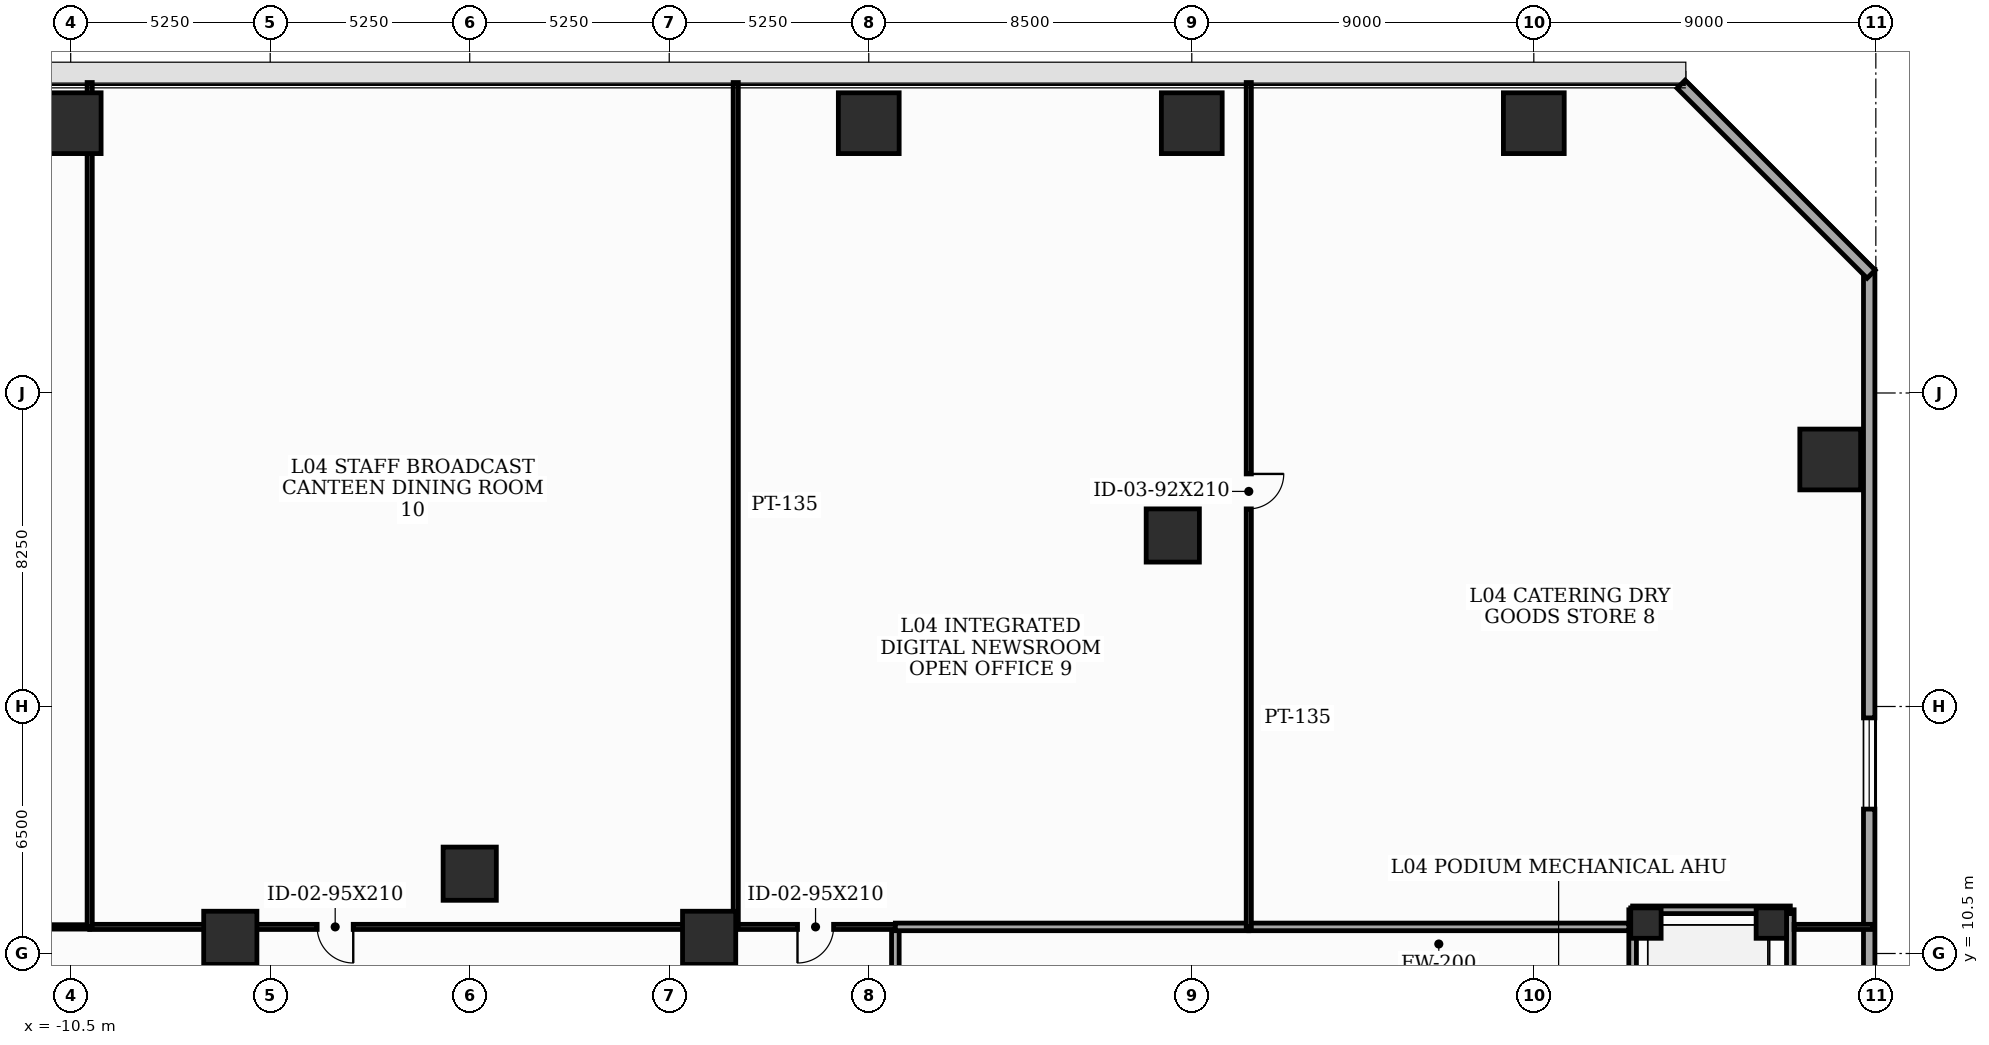
"""IFC4 building model, lengths in metres.
Left out: names, types, materials, properties, quantities, classifications, styles, units other than length and angle.
Written with IfcOpenShell. Run it as: python <this file> out.ifc"""

import sys

from ifc_helpers import new_model, si_unit, direction, frame, frame_2d, origin, origin_2d, place, context, subcontext, project, spatial, rectangle, extrude, element, fill, save


model = new_model("IFC4")
c1 = context("Model", 3, precision=1e-05, world=origin(), true_north=direction((0.0, 1.0)))
c2 = subcontext(c1, "Body", "Model", "MODEL_VIEW")
j1 = project(units=[si_unit("LENGTHUNIT", "METRE"), si_unit("PLANEANGLEUNIT", "RADIAN")], contexts=[c1])
p1 = place(None, origin())
s1 = spatial("IfcSite", under=j1, at=p1, CompositionType="ELEMENT")
p2 = place(p1, origin())
s2 = spatial("IfcBuilding", under=s1, at=p2, CompositionType="ELEMENT")
p3 = place(p2, frame((0.0, 0.0, 20.8)))
s3 = spatial("IfcBuildingStorey", under=s2, at=p3, CompositionType="ELEMENT", Elevation=20.8)
for number, where, z_axis, x_axis in (
    (1, (6.3, 10.912, 0.0), (0.0, 0.0, 1.0), (1.0, 0.0, 0.0)),
    (2, (0.0, 12.6, 0.0), (0.0, 0.0, 1.0), (1.0, 0.0, 0.0)),
    (3, (-6.3, 10.912, 0.0), (0.0, 0.0, 1.0), (1.0, 0.0, 0.0)),
):
    element("IfcColumn", number, at=place(p3, frame(where, z_axis=z_axis, x_axis=x_axis)), inside=s3, PredefinedType="COLUMN", context=c2, shape_type="SweptSolid", body=[
        extrude(rectangle(XDim=1.4, YDim=1.4, at=origin_2d()), origin(), (0.0, 0.0, 1.0), 5.2),
    ])
for number, where, z_axis, x_axis in (
    (4, (35.8, 23.5, 0.0), (0.0, 0.0, 1.0), (1.0, 0.0, 0.0)),
    (5, (28.0, 32.35, 0.0), (0.0, 0.0, 1.0), (1.0, 0.0, 0.0)),
    (6, (19.0, 32.35, 0.0), (0.0, 0.0, 1.0), (1.0, 0.0, 0.0)),
    (7, (10.5, 32.35, 0.0), (0.0, 0.0, 1.0), (1.0, 0.0, 0.0)),
    (8, (-10.5, 32.35, 0.0), (0.0, 0.0, 1.0), (1.0, 0.0, 0.0)),
):
    element("IfcColumn", number, at=place(p3, frame(where, z_axis=z_axis, x_axis=x_axis)), inside=s3, PredefinedType="COLUMN", context=c2, shape_type="SweptSolid", body=[
        extrude(rectangle(XDim=1.6, YDim=1.6, at=origin_2d()), origin(), (0.0, 0.0, 1.0), 5.2),
    ])
p4 = place(p3, frame((18.5, 21.5, 0.0), z_axis=(0.0, 0.0, 1.0), x_axis=(1.0, 0.0, 0.0)))
e9 = element("IfcColumn", 9, at=p4, inside=s3, PredefinedType="COLUMN", context=c2, shape_type="SweptSolid", body=[
    extrude(rectangle(XDim=1.4, YDim=1.4, at=origin_2d()), origin(), (0.0, 0.0, 1.0), 5.2),
])
for number, where, z_axis, x_axis in (
    (10, (34.25, 11.3, 0.0), (0.0, 0.0, 1.0), (1.0, 0.0, 0.0)),
    (11, (30.95, 11.3, 0.0), (0.0, 0.0, 1.0), (1.0, 0.0, 0.0)),
):
    element("IfcColumn", number, at=place(p3, frame(where, z_axis=z_axis, x_axis=x_axis)), inside=s3, PredefinedType="COLUMN", context=c2, shape_type="SweptSolid", body=[
        extrude(rectangle(XDim=0.8, YDim=0.8, at=origin_2d()), origin(), (0.0, 0.0, 1.0), 5.2),
    ])
p5 = place(p3, frame((36.825, -19.5, 0.0), z_axis=(0.0, 0.0, 1.0), x_axis=(0.0, 1.0, 0.0)))
e12 = element("IfcWall", 12, at=p5, inside=s3, PredefinedType="SOLIDWALL", context=c2, shape_type="SweptSolid", body=[
    extrude(rectangle(XDim=48.0, YDim=0.3, at=frame_2d((24.0, 0.0))), origin(), (0.0, 0.0, 1.0), 4.94),
])
p6 = place(p5, frame((3.6, 0.0, 0.9)))
e13 = element("IfcOpeningElement", 13, at=p6, cuts=e12, PredefinedType="OPENING", context=c2, shape_type="SweptSolid", body=[
    extrude(rectangle(XDim=2.4, YDim=1.35, at=frame_2d((1.2, 0.675))), frame((0.0, 0.16, 0.0), z_axis=(0.0, -1.0, 0.0), x_axis=(1.0, 0.0, 0.0)), (0.0, 0.0, 1.0), 0.32),
])
p7 = place(p5, frame((22.8, 0.0, 0.9)))
e14 = element("IfcOpeningElement", 14, at=p7, cuts=e12, PredefinedType="OPENING", context=c2, shape_type="SweptSolid", body=[
    extrude(rectangle(XDim=1.8, YDim=1.35, at=frame_2d((0.9, 0.675))), frame((0.0, 0.16, 0.0), z_axis=(0.0, -1.0, 0.0), x_axis=(1.0, 0.0, 0.0)), (0.0, 0.0, 1.0), 0.32),
])
p8 = place(p5, frame((33.8, 0.0, 0.9)))
e15 = element("IfcOpeningElement", 15, at=p8, cuts=e12, PredefinedType="OPENING", context=c2, shape_type="SweptSolid", body=[
    extrude(rectangle(XDim=2.4, YDim=1.35, at=frame_2d((1.2, 0.675))), frame((0.0, 0.16, 0.0), z_axis=(0.0, -1.0, 0.0), x_axis=(1.0, 0.0, 0.0)), (0.0, 0.0, 1.0), 0.32),
])
p9 = place(p3, frame((36.876, 28.376, 0.0), z_axis=(0.0, 0.0, 1.0), x_axis=(-0.707106781187, 0.707106781187, 0.0)))
e16 = element("IfcWall", 16, at=p9, inside=s3, PredefinedType="SOLIDWALL", context=c2, shape_type="SweptSolid", body=[
    extrude(rectangle(XDim=7.071, YDim=0.3, at=frame_2d((3.536, 0.0))), origin(), (0.0, 0.0, 1.0), 4.94),
])
p10 = place(p3, frame((34.75, 4.2, 0.0), z_axis=(0.0, 0.0, 1.0), x_axis=(0.0, 1.0, 0.0)))
e17 = element("IfcWall", 17, at=p10, inside=s3, PredefinedType="SOLIDWALL", context=c2, shape_type="SweptSolid", body=[
    extrude(rectangle(XDim=7.45, YDim=0.2, at=frame_2d((3.725, 0.0))), origin(), (0.0, 0.0, 1.0), 4.94),
])
p11 = place(p3, frame((34.75, 11.65, 0.0), z_axis=(0.0, 0.0, 1.0), x_axis=(-1.0, 0.0, 0.0)))
e18 = element("IfcWall", 18, at=p11, inside=s3, PredefinedType="SOLIDWALL", context=c2, shape_type="SweptSolid", body=[
    extrude(rectangle(XDim=4.15, YDim=0.2, at=frame_2d((2.075, 0.0))), origin(), (0.0, 0.0, 1.0), 4.94),
])
p12 = place(p3, frame((30.6, 11.65, 0.0), z_axis=(0.0, 0.0, 1.0), x_axis=(0.0, -1.0, 0.0)))
e19 = element("IfcWall", 19, at=p12, inside=s3, PredefinedType="SOLIDWALL", context=c2, shape_type="SweptSolid", body=[
    extrude(rectangle(XDim=7.45, YDim=0.2, at=frame_2d((3.725, 0.0))), origin(), (0.0, 0.0, 1.0), 4.94),
])
p13 = place(p12, frame((6.04, 0.0, 0.0)))
e20 = element("IfcOpeningElement", 20, at=p13, cuts=e19, PredefinedType="OPENING", context=c2, shape_type="SweptSolid", body=[
    extrude(rectangle(XDim=1.05, YDim=2.15, at=frame_2d((0.525, 1.075))), frame((0.0, 0.11, 0.0), z_axis=(0.0, -1.0, 0.0), x_axis=(1.0, 0.0, 0.0)), (0.0, 0.0, 1.0), 0.22),
])
p14 = place(p3, frame((11.2, 8.4, 0.0), z_axis=(0.0, 0.0, 1.0), x_axis=(0.0, 1.0, 0.0)))
e21 = element("IfcWall", 21, at=p14, inside=s3, PredefinedType="SOLIDWALL", context=c2, shape_type="SweptSolid", body=[
    extrude(rectangle(XDim=2.8, YDim=0.2, at=frame_2d((1.4, 0.0))), origin(), (0.0, 0.0, 1.0), 3.525),
])
p15 = place(p3, frame((11.2, 11.2, 0.0), z_axis=(0.0, 0.0, 1.0), x_axis=(-1.0, 0.0, 0.0)))
e22 = element("IfcWall", 22, at=p15, inside=s3, PredefinedType="PARTITIONING", context=c2, shape_type="SweptSolid", body=[
    extrude(rectangle(XDim=4.2, YDim=0.135, at=frame_2d((2.1, 0.0))), origin(), (0.0, 0.0, 1.0), 3.525),
])
p16 = place(p15, frame((1.625, 0.0, 0.0)))
e23 = element("IfcOpeningElement", 23, at=p16, cuts=e22, PredefinedType="OPENING", context=c2, shape_type="SweptSolid", body=[
    extrude(rectangle(XDim=0.95, YDim=2.1, at=frame_2d((0.475, 1.05))), frame((0.0, 0.077, 0.0), z_axis=(0.0, -1.0, 0.0), x_axis=(1.0, 0.0, 0.0)), (0.0, 0.0, 1.0), 0.155),
])
p17 = place(p3, frame((7.0, 11.2, 0.0), z_axis=(0.0, 0.0, 1.0), x_axis=(-1.0, 0.0, 0.0)))
e24 = element("IfcWall", 24, at=p17, inside=s3, PredefinedType="PARTITIONING", context=c2, shape_type="SweptSolid", body=[
    extrude(rectangle(XDim=17.0, YDim=0.135, at=frame_2d((8.5, 0.0))), origin(), (0.0, 0.0, 1.0), 3.525),
])
p18 = place(p17, frame((10.065, 0.0, 0.0)))
e25 = element("IfcOpeningElement", 25, at=p18, cuts=e24, PredefinedType="OPENING", context=c2, shape_type="SweptSolid", body=[
    extrude(rectangle(XDim=0.95, YDim=2.1, at=frame_2d((0.475, 1.05))), frame((0.0, 0.077, 0.0), z_axis=(0.0, -1.0, 0.0), x_axis=(1.0, 0.0, 0.0)), (0.0, 0.0, 1.0), 0.155),
])
p19 = place(p3, frame((-10.0, 11.2, 0.0), z_axis=(0.0, 0.0, 1.0), x_axis=(-1.0, 0.0, 0.0)))
e26 = element("IfcWall", 26, at=p19, inside=s3, PredefinedType="PARTITIONING", context=c2, shape_type="SweptSolid", body=[
    extrude(rectangle(XDim=1.2, YDim=0.115, at=frame_2d((0.6, 0.0))), origin(), (0.0, 0.0, 1.0), 3.525),
])
p20 = place(p3, frame((36.92, 11.2, 0.0), z_axis=(0.0, 0.0, 1.0), x_axis=(-1.0, 0.0, 0.0)))
e27 = element("IfcWall", 27, at=p20, inside=s3, PredefinedType="PARTITIONING", context=c2, shape_type="SweptSolid", body=[
    extrude(rectangle(XDim=2.07, YDim=0.135, at=frame_2d((1.035, 0.0))), origin(), (0.0, 0.0, 1.0), 3.425),
])
p21 = place(p3, frame((30.5, 11.2, 0.0), z_axis=(0.0, 0.0, 1.0), x_axis=(-1.0, 0.0, 0.0)))
e28 = element("IfcWall", 28, at=p21, inside=s3, PredefinedType="SOLIDWALL", context=c2, shape_type="SweptSolid", body=[
    extrude(rectangle(XDim=10.0, YDim=0.2, at=frame_2d((5.0, 0.0))), origin(), (0.0, 0.0, 1.0), 4.94),
])
p22 = place(p3, frame((20.5, 11.2, 0.0), z_axis=(0.0, 0.0, 1.0), x_axis=(-1.0, 0.0, 0.0)))
e29 = element("IfcWall", 29, at=p22, inside=s3, PredefinedType="SOLIDWALL", context=c2, shape_type="SweptSolid", body=[
    extrude(rectangle(XDim=9.3, YDim=0.2, at=frame_2d((4.65, 0.0))), origin(), (0.0, 0.0, 1.0), 3.525),
])
p23 = place(p3, frame((20.5, 33.42, 0.0), z_axis=(0.0, 0.0, 1.0), x_axis=(0.0, -1.0, 0.0)))
e30 = element("IfcWall", 30, at=p23, inside=s3, PredefinedType="PARTITIONING", context=c2, shape_type="SweptSolid", body=[
    extrude(rectangle(XDim=22.22, YDim=0.135, at=frame_2d((11.11, 0.0))), origin(), (0.0, 0.0, 1.0), 3.425),
])
p24 = place(p23, frame((10.3, 0.0, 0.0)))
e31 = element("IfcOpeningElement", 31, at=p24, cuts=e30, PredefinedType="OPENING", context=c2, shape_type="SweptSolid", body=[
    extrude(rectangle(XDim=0.92, YDim=2.1, at=frame_2d((0.46, 1.05))), frame((0.0, 0.077, 0.0), z_axis=(0.0, -1.0, 0.0), x_axis=(1.0, 0.0, 0.0)), (0.0, 0.0, 1.0), 0.155),
])
for number, where, z_axis, x_axis in (
    (32, (7.0, 33.42, 0.0), (0.0, 0.0, 1.0), (0.0, -1.0, 0.0)),
    (33, (-10.0, 33.42, 0.0), (0.0, 0.0, 1.0), (0.0, -1.0, 0.0)),
):
    element("IfcWall", number, at=place(p3, frame(where, z_axis=z_axis, x_axis=x_axis)), inside=s3, PredefinedType="PARTITIONING", context=c2, shape_type="SweptSolid", body=[
        extrude(rectangle(XDim=22.22, YDim=0.135, at=frame_2d((11.11, 0.0))), origin(), (0.0, 0.0, 1.0), 3.425),
    ])
p25 = place(p8, origin())
e34 = element("IfcWindow", 34, at=p25, inside=s3, PartitioningType="SINGLE_PANEL", PredefinedType="WINDOW", context=c2, shape_type="SweptSolid", body=[
    extrude(rectangle(XDim=2.4, YDim=1.35, at=frame_2d((1.2, 0.675))), frame((0.0, 0.03, 0.0), z_axis=(0.0, -1.0, 0.0), x_axis=(1.0, 0.0, 0.0)), (0.0, 0.0, 1.0), 0.06),
])
fill(e15, e34)
p26 = place(p16, origin())
e35 = element("IfcDoor", 35, at=p26, inside=s3, OperationType="SINGLE_SWING_RIGHT", PredefinedType="DOOR", context=c2, shape_type="SweptSolid", body=[
    extrude(rectangle(XDim=0.95, YDim=2.1, at=frame_2d((0.475, 1.05))), frame((0.0, 0.025, 0.0), z_axis=(0.0, -1.0, 0.0), x_axis=(1.0, 0.0, 0.0)), (0.0, 0.0, 1.0), 0.05),
])
fill(e23, e35)
p27 = place(p18, origin())
e36 = element("IfcDoor", 36, at=p27, inside=s3, OperationType="SINGLE_SWING_LEFT", PredefinedType="DOOR", context=c2, shape_type="SweptSolid", body=[
    extrude(rectangle(XDim=0.95, YDim=2.1, at=frame_2d((0.475, 1.05))), frame((0.0, 0.025, 0.0), z_axis=(0.0, -1.0, 0.0), x_axis=(1.0, 0.0, 0.0)), (0.0, 0.0, 1.0), 0.05),
])
fill(e25, e36)
p28 = place(p24, origin())
e37 = element("IfcDoor", 37, at=p28, inside=s3, OperationType="SINGLE_SWING_LEFT", PredefinedType="DOOR", context=c2, shape_type="SweptSolid", body=[
    extrude(rectangle(XDim=0.92, YDim=2.1, at=frame_2d((0.46, 1.05))), frame((0.0, 0.025, 0.0), z_axis=(0.0, -1.0, 0.0), x_axis=(1.0, 0.0, 0.0)), (0.0, 0.0, 1.0), 0.05),
])
fill(e31, e37)
save(model, sys.argv[1])
